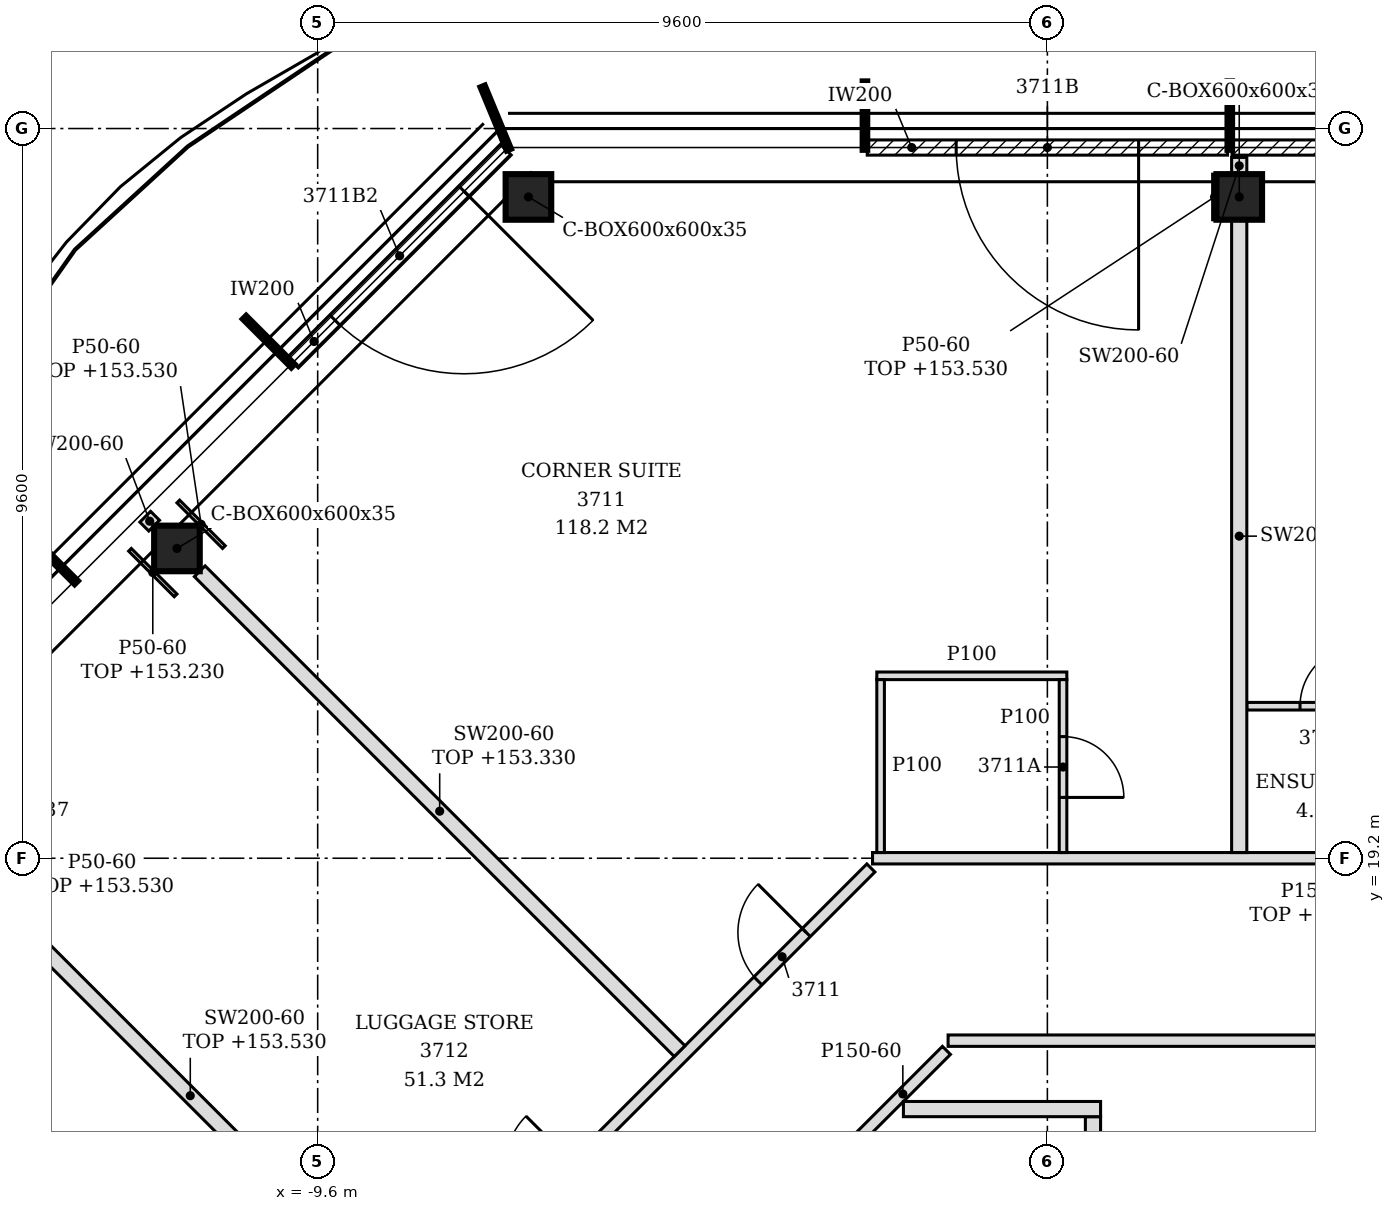
"""IFC4 building model, lengths in metres.
Left out: names, types, materials, properties, quantities, classifications, styles, units other than length and angle.
Written with IfcOpenShell. Run it as: python <this file> out.ifc"""

import sys

from ifc_helpers import new_model, si_unit, direction, frame, frame_2d, origin, origin_2d, place, context, subcontext, project, spatial, polyline, rectangle, hollow_rectangle, outline, extrude, element, fill, save


model = new_model("IFC4")
c1 = context("Model", 3, precision=1e-05, world=origin(), true_north=direction((0.0, 1.0)))
c2 = subcontext(c1, "Body", "Model", "MODEL_VIEW")
j1 = project(units=[si_unit("LENGTHUNIT", "METRE"), si_unit("PLANEANGLEUNIT", "RADIAN")], contexts=[c1])
p1 = place(None, origin())
s1 = spatial("IfcSite", under=j1, at=p1, CompositionType="ELEMENT")
p2 = place(p1, origin())
s2 = spatial("IfcBuilding", under=s1, at=p2, CompositionType="ELEMENT")
p3 = place(p2, frame((0.0, 0.0, 150.6)))
s3 = spatial("IfcBuildingStorey", under=s2, at=p3, CompositionType="ELEMENT", Elevation=150.6)
for number, where, z_axis, x_axis in (
    (1, (2.524, 27.9, -0.15), (0.0, 0.0, 1.0), (1.0, 0.0, 0.0)),
    (2, (-6.827, 27.9, -0.15), (0.0, 0.0, 1.0), (1.0, 0.0, 0.0)),
    (3, (-11.451, 23.276, -0.15), (0.0, 0.0, 1.0), (1.0, 0.0, 0.0)),
):
    element("IfcColumn", number, at=place(p3, frame(where, z_axis=z_axis, x_axis=x_axis)), inside=s3, PredefinedType="COLUMN", context=c2, shape_type="SweptSolid", body=[
        extrude(hollow_rectangle(XDim=0.6, YDim=0.6, WallThickness=0.035, at=origin_2d()), origin(), (0.0, 0.0, 1.0), 3.6),
    ])
p4 = place(p3, frame((7.17, 28.55, 0.0), z_axis=(0.0, 0.0, 1.0), x_axis=(-1.0, 0.0, 0.0)))
e4 = element("IfcWall", 4, at=p4, inside=s3, PredefinedType="NOTDEFINED", context=c2, shape_type="SweptSolid", body=[
    extrude(rectangle(XDim=4.74, YDim=0.2, at=frame_2d((2.37, 0.0))), origin(), (0.0, 0.0, 1.0), 3.45),
])
p5 = place(p4, frame((1.17, 0.0, 0.0)))
e5 = element("IfcOpeningElement", 5, at=p5, cuts=e4, PredefinedType="OPENING", context=c2, shape_type="SweptSolid", body=[
    extrude(rectangle(XDim=2.4, YDim=2.4, at=frame_2d((1.2, 1.2))), frame((0.0, 0.11, 0.0), z_axis=(0.0, -1.0, 0.0), x_axis=(1.0, 0.0, 0.0)), (0.0, 0.0, 1.0), 0.22),
])
p6 = place(p3, frame((2.37, 28.55, 0.0), z_axis=(0.0, 0.0, 1.0), x_axis=(-1.0, 0.0, 0.0)))
e6 = element("IfcWall", 6, at=p6, inside=s3, PredefinedType="NOTDEFINED", context=c2, shape_type="SweptSolid", body=[
    extrude(rectangle(XDim=4.74, YDim=0.2, at=frame_2d((2.37, 0.0))), origin(), (0.0, 0.0, 1.0), 3.45),
])
p7 = place(p6, frame((1.17, 0.0, 0.0)))
e7 = element("IfcOpeningElement", 7, at=p7, cuts=e6, PredefinedType="OPENING", context=c2, shape_type="SweptSolid", body=[
    extrude(rectangle(XDim=2.4, YDim=2.4, at=frame_2d((1.2, 1.2))), frame((0.0, 0.11, 0.0), z_axis=(0.0, -1.0, 0.0), x_axis=(1.0, 0.0, 0.0)), (0.0, 0.0, 1.0), 0.22),
])
p8 = place(p3, frame((-7.125, 28.522, 0.0), z_axis=(0.0, 0.0, 1.0), x_axis=(-0.707106781187, -0.707106781187, 0.0)))
e8 = element("IfcWall", 8, at=p8, inside=s3, PredefinedType="NOTDEFINED", context=c2, shape_type="SweptSolid", body=[
    extrude(rectangle(XDim=3.962, YDim=0.2, at=frame_2d((1.981, 0.0))), origin(), (0.0, 0.0, 1.0), 3.45),
])
p9 = place(p8, frame((0.775, 0.0, 0.0)))
e9 = element("IfcOpeningElement", 9, at=p9, cuts=e8, PredefinedType="OPENING", context=c2, shape_type="SweptSolid", body=[
    extrude(rectangle(XDim=2.4, YDim=2.4, at=frame_2d((1.2, 1.2))), frame((0.0, 0.11, 0.0), z_axis=(0.0, -1.0, 0.0), x_axis=(1.0, 0.0, 0.0)), (0.0, 0.0, 1.0), 0.22),
])
p10 = place(p3, frame((-12.075, 9.319, 0.0), z_axis=(0.0, 0.0, 1.0), x_axis=(0.707106781187, 0.707106781187, 0.0)))
e10 = element("IfcWall", 10, at=p10, inside=s3, PredefinedType="PARTITIONING", context=c2, shape_type="SweptSolid", body=[
    extrude(rectangle(XDim=13.793, YDim=0.15, at=frame_2d((6.896, 0.0))), origin(), (0.0, 0.0, 1.0), 2.73),
])
p11 = place(p10, frame((11.692, 0.0, 0.0)))
e11 = element("IfcOpeningElement", 11, at=p11, cuts=e10, PredefinedType="OPENING", context=c2, shape_type="SweptSolid", body=[
    extrude(rectangle(XDim=0.9, YDim=2.1, at=frame_2d((0.45, 1.05))), frame((0.0, 0.085, 0.0), z_axis=(0.0, -1.0, 0.0), x_axis=(1.0, 0.0, 0.0)), (0.0, 0.0, 1.0), 0.17),
])
p12 = place(p10, frame((7.376, 0.0, 0.0)))
e12 = element("IfcOpeningElement", 12, at=p12, cuts=e10, PredefinedType="OPENING", context=c2, shape_type="SweptSolid", body=[
    extrude(rectangle(XDim=0.9, YDim=2.1, at=frame_2d((0.45, 1.05))), frame((0.0, 0.085, 0.0), z_axis=(0.0, -1.0, 0.0), x_axis=(1.0, 0.0, 0.0)), (0.0, 0.0, 1.0), 0.17),
])
p13 = place(p10, frame((3.62, 0.0, 0.0)))
e13 = element("IfcOpeningElement", 13, at=p13, cuts=e10, PredefinedType="OPENING", context=c2, shape_type="SweptSolid", body=[
    extrude(rectangle(XDim=0.9, YDim=2.1, at=frame_2d((0.45, 1.05))), frame((0.0, 0.085, 0.0), z_axis=(0.0, -1.0, 0.0), x_axis=(1.0, 0.0, 0.0)), (0.0, 0.0, 1.0), 0.17),
])
p14 = place(p3, frame((-8.35, 13.15, 0.0), z_axis=(0.0, 0.0, 1.0), x_axis=(-0.707092030896, 0.707121531169, 0.0)))
e14 = element("IfcWall", 14, at=p14, inside=s3, PredefinedType="PARTITIONING", context=c2, shape_type="SweptSolid", body=[
    extrude(rectangle(XDim=8.276, YDim=0.2, at=frame_2d((4.138, 0.0))), origin(), (0.0, 0.0, 1.0), 2.93),
])
p15 = place(p3, frame((0.6, 13.275, 0.0), z_axis=(0.0, 0.0, 1.0), x_axis=(0.0, 1.0, 0.0)))
e15 = element("IfcWall", 15, at=p15, inside=s3, PredefinedType="PARTITIONING", context=c2, shape_type="SweptSolid", body=[
    extrude(outline(polyline([(0.0, 0.0), (2.525, 0.0), (2.525, 3.45), (0.075, 3.45), (0.073, 2.83), (0.0, 2.83), (0.0, 0.0)])), frame((0.0, 0.1, 0.0), z_axis=(0.0, -1.0, 0.0), x_axis=(1.0, 0.0, 0.0)), (0.0, 0.0, 1.0), 0.2),
])
p16 = place(p3, frame((-2.475, 15.525, 0.0), z_axis=(0.0, 0.0, 1.0), x_axis=(0.707106781187, 0.707106781187, 0.0)))
e16 = element("IfcWall", 16, at=p16, inside=s3, PredefinedType="PARTITIONING", context=c2, shape_type="SweptSolid", body=[
    extrude(rectangle(XDim=1.622, YDim=0.15, at=frame_2d((0.811, 0.0))), origin(), (0.0, 0.0, 1.0), 3.45),
])
p17 = place(p3, frame((-1.894, 15.9, 0.0), z_axis=(0.0, 0.0, 1.0), x_axis=(1.0, 0.0, 0.0)))
e17 = element("IfcWall", 17, at=p17, inside=s3, PredefinedType="PARTITIONING", context=c2, shape_type="SweptSolid", body=[
    extrude(rectangle(XDim=2.594, YDim=0.2, at=frame_2d((1.297, 0.0))), origin(), (0.0, 0.0, 1.0), 3.45),
])
p18 = place(p3, frame((-4.838, 16.662, 0.0), z_axis=(0.0, 0.0, 1.0), x_axis=(-0.707120452615, 0.707093109494, 0.0)))
e18 = element("IfcWall", 18, at=p18, inside=s3, PredefinedType="PARTITIONING", context=c2, shape_type="SweptSolid", body=[
    extrude(rectangle(XDim=8.929, YDim=0.2, at=frame_2d((4.464, 0.0))), origin(), (0.0, 0.0, 1.0), 2.73),
])
p19 = place(p3, frame((-1.306, 16.8, 0.0), z_axis=(0.0, 0.0, 1.0), x_axis=(1.0, 0.0, 0.0)))
e19 = element("IfcWall", 19, at=p19, inside=s3, PredefinedType="PARTITIONING", context=c2, shape_type="SweptSolid", body=[
    extrude(outline(polyline([(0.0, 0.0), (17.012, 0.0), (17.012, 3.45), (8.656, 3.45), (8.654, 2.73), (8.356, 2.73), (8.354, 3.45), (0.0, 3.45), (0.0, 0.0)])), frame((0.0, 0.075, 0.0), z_axis=(0.0, -1.0, 0.0), x_axis=(1.0, 0.0, 0.0)), (0.0, 0.0, 1.0), 0.15),
])
p20 = place(p3, frame((-2.3, 19.2, 0.0), z_axis=(0.0, 0.0, 1.0), x_axis=(1.0, 0.0, 0.0)))
e20 = element("IfcWall", 20, at=p20, inside=s3, PredefinedType="PARTITIONING", context=c2, shape_type="SweptSolid", body=[
    extrude(outline(polyline([(0.0, 0.0), (19.0, 0.0), (19.0, 2.88), (9.65, 2.88), (9.648, 2.73), (9.35, 2.73), (9.348, 2.88), (0.0, 2.88), (0.0, 0.0)])), frame((0.0, 0.075, 0.0), z_axis=(0.0, -1.0, 0.0), x_axis=(1.0, 0.0, 0.0)), (0.0, 0.0, 1.0), 0.15),
])
p21 = place(p20, frame((11.809, 0.0, 0.0)))
e21 = element("IfcOpeningElement", 21, at=p21, cuts=e20, PredefinedType="OPENING", context=c2, shape_type="SweptSolid", body=[
    extrude(rectangle(XDim=0.9, YDim=2.1, at=frame_2d((0.45, 1.05))), frame((0.0, 0.085, 0.0), z_axis=(0.0, -1.0, 0.0), x_axis=(1.0, 0.0, 0.0)), (0.0, 0.0, 1.0), 0.17),
])
p22 = place(p3, frame((-2.194, 19.275, 0.0), z_axis=(0.0, 0.0, 1.0), x_axis=(0.0, 1.0, 0.0)))
e22 = element("IfcWall", 22, at=p22, inside=s3, PredefinedType="PARTITIONING", context=c2, shape_type="SweptSolid", body=[
    extrude(outline(polyline([(0.0, 0.0), (2.275, 0.0), (2.275, 3.45), (0.03, 3.45), (0.028, 2.88), (0.0, 2.88), (0.0, 0.0)])), frame((0.0, 0.05, 0.0), z_axis=(0.0, -1.0, 0.0), x_axis=(1.0, 0.0, 0.0)), (0.0, 0.0, 1.0), 0.1),
])
p23 = place(p3, frame((0.206, 19.275, 0.0), z_axis=(0.0, 0.0, 1.0), x_axis=(0.0, 1.0, 0.0)))
e23 = element("IfcWall", 23, at=p23, inside=s3, PredefinedType="PARTITIONING", context=c2, shape_type="SweptSolid", body=[
    extrude(outline(polyline([(0.0, 0.0), (2.275, 0.0), (2.275, 3.45), (0.03, 3.45), (0.028, 2.88), (0.0, 2.88), (0.0, 0.0)])), frame((0.0, 0.05, 0.0), z_axis=(0.0, -1.0, 0.0), x_axis=(1.0, 0.0, 0.0)), (0.0, 0.0, 1.0), 0.1),
])
p24 = place(p23, frame((0.725, 0.0, 0.0)))
e24 = element("IfcOpeningElement", 24, at=p24, cuts=e23, PredefinedType="OPENING", context=c2, shape_type="SweptSolid", body=[
    extrude(rectangle(XDim=0.8, YDim=2.1, at=frame_2d((0.4, 1.05))), frame((0.0, 0.06, 0.0), z_axis=(0.0, -1.0, 0.0), x_axis=(1.0, 0.0, 0.0)), (0.0, 0.0, 1.0), 0.12),
])
p25 = place(p3, frame((2.524, 19.275, 0.0), z_axis=(0.0, 0.0, 1.0), x_axis=(0.0, 1.0, 0.0)))
e25 = element("IfcWall", 25, at=p25, inside=s3, PredefinedType="PARTITIONING", context=c2, shape_type="SweptSolid", body=[
    extrude(outline(polyline([(0.0, 0.0), (8.325, 0.0), (8.325, 3.45), (4.83, 3.45), (4.828, 2.88), (4.62, 2.88), (4.618, 3.45), (0.03, 3.45), (0.028, 2.88), (0.0, 2.88), (0.0, 0.0)])), frame((0.0, 0.1, 0.0), z_axis=(0.0, -1.0, 0.0), x_axis=(1.0, 0.0, 0.0)), (0.0, 0.0, 1.0), 0.2),
])
p26 = place(p3, frame((2.624, 21.2, 0.0), z_axis=(0.0, 0.0, 1.0), x_axis=(1.0, 0.0, 0.0)))
e26 = element("IfcWall", 26, at=p26, inside=s3, PredefinedType="PARTITIONING", context=c2, shape_type="SweptSolid", body=[
    extrude(rectangle(XDim=2.35, YDim=0.1, at=frame_2d((1.175, 0.0))), origin(), (0.0, 0.0, 1.0), 3.45),
])
p27 = place(p26, frame((0.7, 0.0, 0.0)))
e27 = element("IfcOpeningElement", 27, at=p27, cuts=e26, PredefinedType="OPENING", context=c2, shape_type="SweptSolid", body=[
    extrude(rectangle(XDim=0.8, YDim=2.1, at=frame_2d((0.4, 1.05))), frame((0.0, 0.06, 0.0), z_axis=(0.0, -1.0, 0.0), x_axis=(1.0, 0.0, 0.0)), (0.0, 0.0, 1.0), 0.12),
])
p28 = place(p3, frame((-2.244, 21.6, 0.0), z_axis=(0.0, 0.0, 1.0), x_axis=(1.0, 0.0, 0.0)))
e28 = element("IfcWall", 28, at=p28, inside=s3, PredefinedType="PARTITIONING", context=c2, shape_type="SweptSolid", body=[
    extrude(rectangle(XDim=2.5, YDim=0.1, at=frame_2d((1.25, 0.0))), origin(), (0.0, 0.0, 1.0), 3.45),
])
p29 = place(p3, frame((-11.752, 23.576, 0.0), z_axis=(0.0, 0.0, 1.0), x_axis=(-0.707106781187, 0.707106781187, 0.0)))
e29 = element("IfcWall", 29, at=p29, inside=s3, PredefinedType="PARTITIONING", context=c2, shape_type="SweptSolid", body=[
    extrude(rectangle(XDim=0.166, YDim=0.2, at=frame_2d((0.083, 0.0))), origin(), (0.0, 0.0, 1.0), 3.45),
])
p30 = place(p3, frame((2.524, 28.2, 0.0), z_axis=(0.0, 0.0, 1.0), x_axis=(0.0, 1.0, 0.0)))
e30 = element("IfcWall", 30, at=p30, inside=s3, PredefinedType="PARTITIONING", context=c2, shape_type="SweptSolid", body=[
    extrude(rectangle(XDim=0.22, YDim=0.2, at=frame_2d((0.11, 0.0))), origin(), (0.0, 0.0, 1.0), 3.45),
])
p31 = place(p3, frame((-11.469, 22.658, 0.0), z_axis=(0.0, 0.0, 1.0), x_axis=(-0.706962899457, 0.707250633645, 0.0)))
e31 = element("IfcWall", 31, at=p31, inside=s3, PredefinedType="PARTITIONING", context=c2, shape_type="SweptSolid", body=[
    extrude(rectangle(XDim=0.848, YDim=0.05, at=frame_2d((0.424, 0.0))), origin(), (0.0, 0.0, 1.0), 2.63),
])
p32 = place(p3, frame((-10.834, 23.293, 0.0), z_axis=(0.0, 0.0, 1.0), x_axis=(-0.707250633645, 0.706962899457, 0.0)))
e32 = element("IfcWall", 32, at=p32, inside=s3, PredefinedType="PARTITIONING", context=c2, shape_type="SweptSolid", body=[
    extrude(rectangle(XDim=0.848, YDim=0.05, at=frame_2d((0.424, 0.0))), origin(), (0.0, 0.0, 1.0), 2.93),
])
p33 = place(p3, frame((2.199, 27.6, 0.0), z_axis=(0.0, 0.0, 1.0), x_axis=(0.0, 1.0, 0.0)))
e33 = element("IfcWall", 33, at=p33, inside=s3, PredefinedType="PARTITIONING", context=c2, shape_type="SweptSolid", body=[
    extrude(rectangle(XDim=0.6, YDim=0.05, at=frame_2d((0.3, 0.0))), origin(), (0.0, 0.0, 1.0), 2.93),
])
p34 = place(p7, origin())
e34 = element("IfcDoor", 34, at=p34, inside=s3, OperationType="SINGLE_SWING_LEFT", PredefinedType="DOOR", context=c2, shape_type="SweptSolid", body=[
    extrude(rectangle(XDim=2.4, YDim=2.4, at=frame_2d((1.2, 1.2))), frame((0.0, 0.025, 0.0), z_axis=(0.0, -1.0, 0.0), x_axis=(1.0, 0.0, 0.0)), (0.0, 0.0, 1.0), 0.05),
])
fill(e7, e34)
p35 = place(p9, origin())
e35 = element("IfcDoor", 35, at=p35, inside=s3, OperationType="SINGLE_SWING_LEFT", PredefinedType="DOOR", context=c2, shape_type="SweptSolid", body=[
    extrude(rectangle(XDim=2.4, YDim=2.4, at=frame_2d((1.2, 1.2))), frame((0.0, 0.025, 0.0), z_axis=(0.0, -1.0, 0.0), x_axis=(1.0, 0.0, 0.0)), (0.0, 0.0, 1.0), 0.05),
])
fill(e9, e35)
p36 = place(p27, origin())
e36 = element("IfcDoor", 36, at=p36, inside=s3, OperationType="SINGLE_SWING_RIGHT", PredefinedType="DOOR", context=c2, shape_type="SweptSolid", body=[
    extrude(rectangle(XDim=0.8, YDim=2.1, at=frame_2d((0.4, 1.05))), frame((0.0, 0.025, 0.0), z_axis=(0.0, -1.0, 0.0), x_axis=(1.0, 0.0, 0.0)), (0.0, 0.0, 1.0), 0.05),
])
fill(e27, e36)
p37 = place(p11, origin())
e37 = element("IfcDoor", 37, at=p37, inside=s3, OperationType="SINGLE_SWING_RIGHT", PredefinedType="DOOR", context=c2, shape_type="SweptSolid", body=[
    extrude(rectangle(XDim=0.9, YDim=2.1, at=frame_2d((0.45, 1.05))), frame((0.0, 0.025, 0.0), z_axis=(0.0, -1.0, 0.0), x_axis=(1.0, 0.0, 0.0)), (0.0, 0.0, 1.0), 0.05),
])
fill(e11, e37)
p38 = place(p24, frame((0.8, 0.0, 0.0), z_axis=(0.0, 0.0, 1.0), x_axis=(-1.0, 0.0, 0.0)))
e38 = element("IfcDoor", 38, at=p38, inside=s3, OperationType="SINGLE_SWING_RIGHT", PredefinedType="DOOR", context=c2, shape_type="SweptSolid", body=[
    extrude(rectangle(XDim=0.8, YDim=2.1, at=frame_2d((0.4, 1.05))), frame((0.0, 0.025, 0.0), z_axis=(0.0, -1.0, 0.0), x_axis=(1.0, 0.0, 0.0)), (0.0, 0.0, 1.0), 0.05),
])
fill(e24, e38)
save(model, sys.argv[1])
